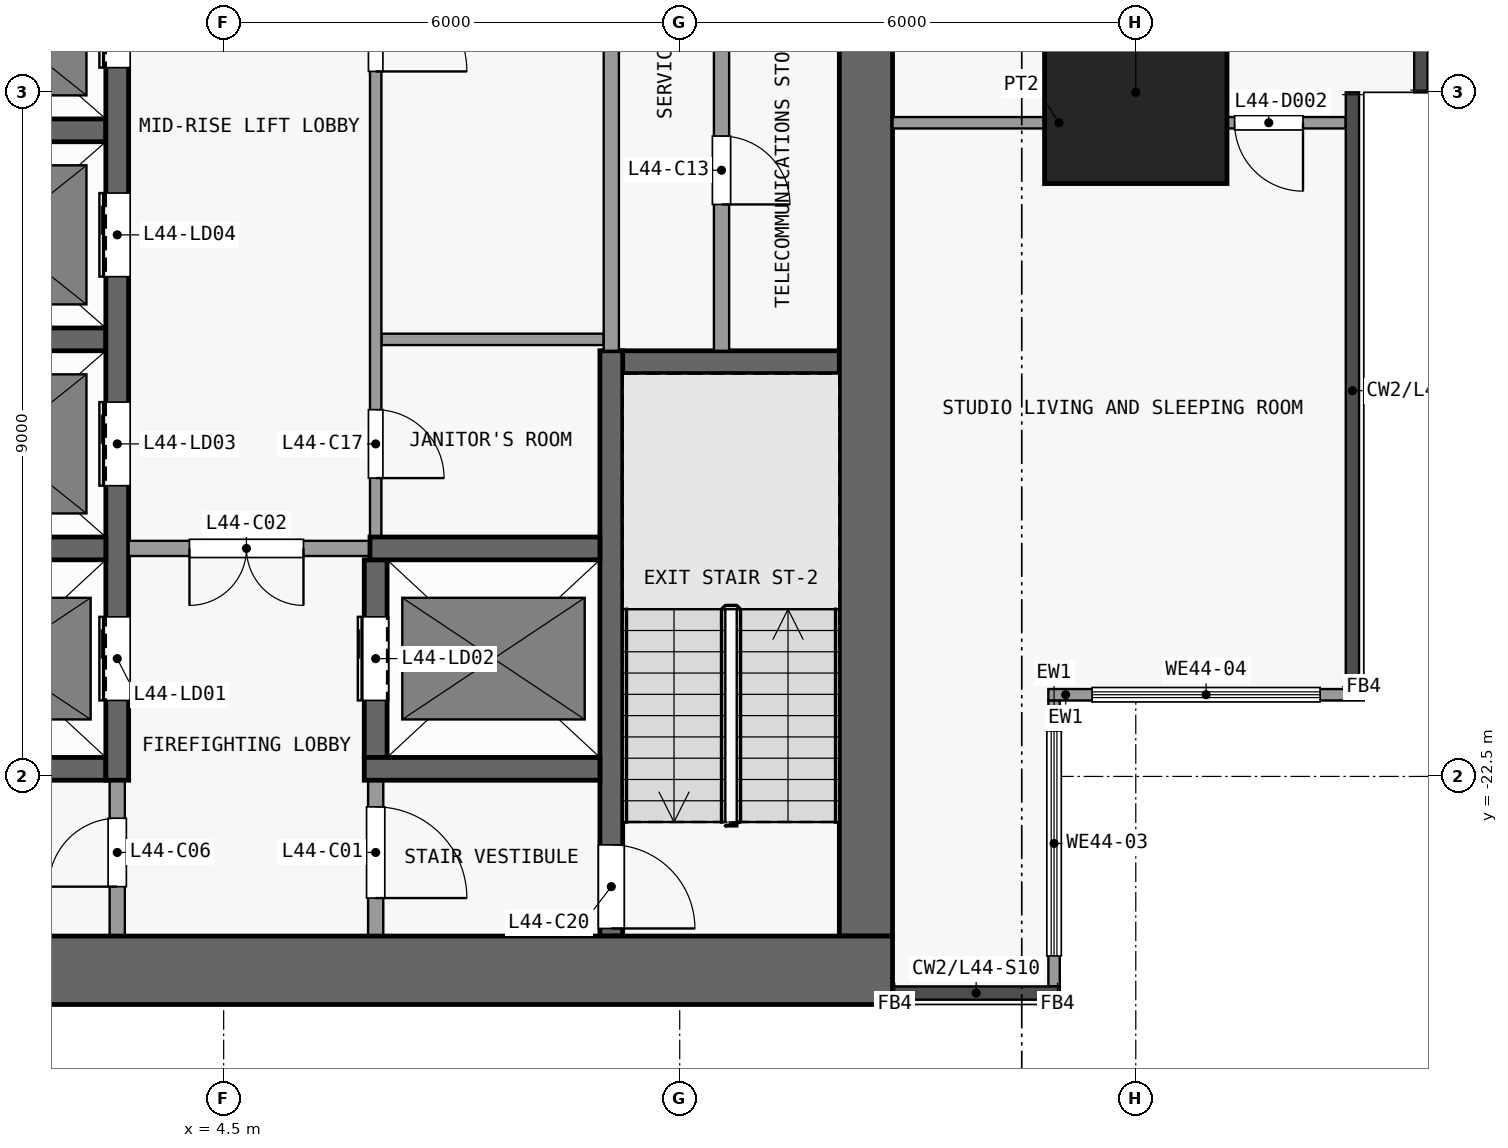
"""IFC4 building model, lengths in metres.
Left out: names, types, materials, properties, quantities, classifications, styles, units other than length and angle.
Written with IfcOpenShell. Run it as: python <this file> out.ifc"""

import sys

from ifc_helpers import new_model, si_unit, direction, frame, frame_2d, origin, origin_2d, place, context, subcontext, project, spatial, rectangle, extrude, element, fill, save


model = new_model("IFC4")
c1 = context("Model", 3, precision=1e-05, world=origin(), true_north=direction((0.0, 1.0)))
c2 = subcontext(c1, "Body", "Model", "MODEL_VIEW")
j1 = project(units=[si_unit("LENGTHUNIT", "METRE"), si_unit("PLANEANGLEUNIT", "RADIAN")], contexts=[c1])
p1 = place(None, origin())
s1 = spatial("IfcSite", under=j1, at=p1, CompositionType="ELEMENT")
p2 = place(p1, origin())
s2 = spatial("IfcBuilding", under=s1, at=p2, CompositionType="ELEMENT")
p3 = place(p2, frame((0.0, 0.0, 178.1)))
s3 = spatial("IfcBuildingStorey", under=s2, at=p3, CompositionType="ELEMENT", Elevation=178.1)
p4 = place(p3, frame((16.5, -13.5, 0.0), z_axis=(0.0, 0.0, 1.0), x_axis=(1.0, 0.0, 0.0)))
e1 = element("IfcColumn", 1, at=p4, inside=s3, PredefinedType="COLUMN", context=c2, shape_type="SweptSolid", body=[
    extrude(rectangle(XDim=2.4, YDim=2.4, at=origin_2d()), origin(), (0.0, 0.0, 1.0), 3.6),
])
p5 = place(p3, frame((-13.3, -25.05, 0.0), z_axis=(0.0, 0.0, 1.0), x_axis=(1.0, 0.0, 0.0)))
e2 = element("IfcWall", 2, at=p5, inside=s3, PredefinedType="SHEAR", context=c2, shape_type="SweptSolid", body=[
    extrude(rectangle(XDim=26.6, YDim=0.9, at=frame_2d((13.3, 0.0))), origin(), (0.0, 0.0, 1.0), 3.3),
])
p6 = place(p3, frame((12.95, -24.6, 0.0), z_axis=(0.0, 0.0, 1.0), x_axis=(0.0, 1.0, 0.0)))
e3 = element("IfcWall", 3, at=p6, inside=s3, PredefinedType="SHEAR", context=c2, shape_type="SweptSolid", body=[
    extrude(rectangle(XDim=16.1, YDim=0.7, at=frame_2d((8.05, 0.0))), origin(), (0.0, 0.0, 1.0), 3.3),
])
p7 = place(p3, frame((-3.25, -22.4, 0.0), z_axis=(0.0, 0.0, 1.0), x_axis=(1.0, 0.0, 0.0)))
e4 = element("IfcWall", 4, at=p7, inside=s3, PredefinedType="SHEAR", context=c2, shape_type="SweptSolid", body=[
    extrude(rectangle(XDim=6.2, YDim=0.3, at=frame_2d((3.1, 0.0))), origin(), (0.0, 0.0, 1.0), 3.3),
])
p8 = place(p3, frame((6.35, -22.4, 0.0), z_axis=(0.0, 0.0, 1.0), x_axis=(1.0, 0.0, 0.0)))
e5 = element("IfcWall", 5, at=p8, inside=s3, PredefinedType="SHEAR", context=c2, shape_type="SweptSolid", body=[
    extrude(rectangle(XDim=3.1, YDim=0.3, at=frame_2d((1.55, 0.0))), origin(), (0.0, 0.0, 1.0), 3.3),
])
p9 = place(p3, frame((0.15, -19.5, 0.0), z_axis=(0.0, 0.0, 1.0), x_axis=(1.0, 0.0, 0.0)))
e6 = element("IfcWall", 6, at=p9, inside=s3, PredefinedType="SHEAR", context=c2, shape_type="SweptSolid", body=[
    extrude(rectangle(XDim=2.8, YDim=0.3, at=frame_2d((1.4, 0.0))), origin(), (0.0, 0.0, 1.0), 3.3),
])
p10 = place(p3, frame((6.575, -19.5, 0.0), z_axis=(0.0, 0.0, 1.0), x_axis=(-1.0, 0.0, 0.0)))
e7 = element("IfcWall", 7, at=p10, inside=s3, PredefinedType="PARTITIONING", context=c2, shape_type="SweptSolid", body=[
    extrude(rectangle(XDim=3.325, YDim=0.2, at=frame_2d((1.663, 0.0))), origin(), (0.0, 0.0, 1.0), 3.3),
])
p11 = place(p10, frame((1.025, 0.0, 0.0)))
e8 = element("IfcOpeningElement", 8, at=p11, cuts=e7, PredefinedType="OPENING", context=c2, shape_type="SweptSolid", body=[
    extrude(rectangle(XDim=1.5, YDim=2.1, at=frame_2d((0.75, 1.05))), frame((0.0, 0.11, 0.0), z_axis=(0.0, -1.0, 0.0), x_axis=(1.0, 0.0, 0.0)), (0.0, 0.0, 1.0), 0.22),
])
p12 = place(p3, frame((6.425, -19.5, 0.0), z_axis=(0.0, 0.0, 1.0), x_axis=(1.0, 0.0, 0.0)))
e9 = element("IfcWall", 9, at=p12, inside=s3, PredefinedType="SHEAR", context=c2, shape_type="SweptSolid", body=[
    extrude(rectangle(XDim=3.025, YDim=0.3, at=frame_2d((1.512, 0.0))), origin(), (0.0, 0.0, 1.0), 3.3),
])
p13 = place(p3, frame((9.5, -17.05, 0.0), z_axis=(0.0, 0.0, 1.0), x_axis=(1.0, 0.0, 0.0)))
e10 = element("IfcWall", 10, at=p13, inside=s3, PredefinedType="SHEAR", context=c2, shape_type="SweptSolid", body=[
    extrude(rectangle(XDim=3.1, YDim=0.3, at=frame_2d((1.55, 0.0))), origin(), (0.0, 0.0, 1.0), 3.3),
])
p14 = place(p3, frame((0.15, -16.75, 0.0), z_axis=(0.0, 0.0, 1.0), x_axis=(1.0, 0.0, 0.0)))
e11 = element("IfcWall", 11, at=p14, inside=s3, PredefinedType="SHEAR", context=c2, shape_type="SweptSolid", body=[
    extrude(rectangle(XDim=2.8, YDim=0.3, at=frame_2d((1.4, 0.0))), origin(), (0.0, 0.0, 1.0), 3.3),
])
p15 = place(p3, frame((6.575, -16.75, 0.0), z_axis=(0.0, 0.0, 1.0), x_axis=(1.0, 0.0, 0.0)))
e12 = element("IfcWall", 12, at=p15, inside=s3, PredefinedType="PARTITIONING", context=c2, shape_type="SweptSolid", body=[
    extrude(rectangle(XDim=2.925, YDim=0.15, at=frame_2d((1.462, 0.0))), origin(), (0.0, 0.0, 1.0), 3.3),
])
p16 = place(p3, frame((0.15, -14.0, 0.0), z_axis=(0.0, 0.0, 1.0), x_axis=(1.0, 0.0, 0.0)))
e13 = element("IfcWall", 13, at=p16, inside=s3, PredefinedType="SHEAR", context=c2, shape_type="SweptSolid", body=[
    extrude(rectangle(XDim=2.8, YDim=0.3, at=frame_2d((1.4, 0.0))), origin(), (0.0, 0.0, 1.0), 3.3),
])
p17 = place(p3, frame((3.1, -24.6, 0.0), z_axis=(0.0, 0.0, 1.0), x_axis=(0.0, 1.0, 0.0)))
e14 = element("IfcWall", 14, at=p17, inside=s3, PredefinedType="PARTITIONING", context=c2, shape_type="SweptSolid", body=[
    extrude(rectangle(XDim=2.05, YDim=0.2, at=frame_2d((1.025, 0.0))), origin(), (0.0, 0.0, 1.0), 3.3),
])
p18 = place(p17, frame((0.65, 0.0, 0.0)))
e15 = element("IfcOpeningElement", 15, at=p18, cuts=e14, PredefinedType="OPENING", context=c2, shape_type="SweptSolid", body=[
    extrude(rectangle(XDim=0.9, YDim=2.1, at=frame_2d((0.45, 1.05))), frame((0.0, 0.11, 0.0), z_axis=(0.0, -1.0, 0.0), x_axis=(1.0, 0.0, 0.0)), (0.0, 0.0, 1.0), 0.22),
])
p19 = place(p3, frame((3.1, -22.55, 0.0), z_axis=(0.0, 0.0, 1.0), x_axis=(0.0, 1.0, 0.0)))
e16 = element("IfcWall", 16, at=p19, inside=s3, PredefinedType="SHEAR", context=c2, shape_type="SweptSolid", body=[
    extrude(rectangle(XDim=14.05, YDim=0.3, at=frame_2d((7.025, 0.0))), origin(), (0.0, 0.0, 1.0), 3.3),
])
p20 = place(p19, frame((1.05, 0.0, 0.0)))
e17 = element("IfcOpeningElement", 17, at=p20, cuts=e16, PredefinedType="OPENING", context=c2, shape_type="SweptSolid", body=[
    extrude(rectangle(XDim=1.1, YDim=2.1, at=frame_2d((0.55, 1.05))), frame((0.0, 0.16, 0.0), z_axis=(0.0, -1.0, 0.0), x_axis=(1.0, 0.0, 0.0)), (0.0, 0.0, 1.0), 0.32),
])
p21 = place(p19, frame((3.875, 0.0, 0.0)))
e18 = element("IfcOpeningElement", 18, at=p21, cuts=e16, PredefinedType="OPENING", context=c2, shape_type="SweptSolid", body=[
    extrude(rectangle(XDim=1.1, YDim=2.1, at=frame_2d((0.55, 1.05))), frame((0.0, 0.16, 0.0), z_axis=(0.0, -1.0, 0.0), x_axis=(1.0, 0.0, 0.0)), (0.0, 0.0, 1.0), 0.32),
])
p22 = place(p19, frame((6.625, 0.0, 0.0)))
e19 = element("IfcOpeningElement", 19, at=p22, cuts=e16, PredefinedType="OPENING", context=c2, shape_type="SweptSolid", body=[
    extrude(rectangle(XDim=1.1, YDim=2.1, at=frame_2d((0.55, 1.05))), frame((0.0, 0.16, 0.0), z_axis=(0.0, -1.0, 0.0), x_axis=(1.0, 0.0, 0.0)), (0.0, 0.0, 1.0), 0.32),
])
p23 = place(p19, frame((9.375, 0.0, 0.0)))
e20 = element("IfcOpeningElement", 20, at=p23, cuts=e16, PredefinedType="OPENING", context=c2, shape_type="SweptSolid", body=[
    extrude(rectangle(XDim=1.1, YDim=2.1, at=frame_2d((0.55, 1.05))), frame((0.0, 0.16, 0.0), z_axis=(0.0, -1.0, 0.0), x_axis=(1.0, 0.0, 0.0)), (0.0, 0.0, 1.0), 0.32),
])
p24 = place(p19, frame((12.125, 0.0, 0.0)))
e21 = element("IfcOpeningElement", 21, at=p24, cuts=e16, PredefinedType="OPENING", context=c2, shape_type="SweptSolid", body=[
    extrude(rectangle(XDim=1.1, YDim=2.1, at=frame_2d((0.55, 1.05))), frame((0.0, 0.16, 0.0), z_axis=(0.0, -1.0, 0.0), x_axis=(1.0, 0.0, 0.0)), (0.0, 0.0, 1.0), 0.32),
])
p25 = place(p3, frame((6.5, -22.55, 0.0), z_axis=(0.0, 0.0, 1.0), x_axis=(0.0, -1.0, 0.0)))
e22 = element("IfcWall", 22, at=p25, inside=s3, PredefinedType="PARTITIONING", context=c2, shape_type="SweptSolid", body=[
    extrude(rectangle(XDim=2.05, YDim=0.2, at=frame_2d((1.025, 0.0))), origin(), (0.0, 0.0, 1.0), 3.3),
])
p26 = place(p25, frame((0.35, 0.0, 0.0)))
e23 = element("IfcOpeningElement", 23, at=p26, cuts=e22, PredefinedType="OPENING", context=c2, shape_type="SweptSolid", body=[
    extrude(rectangle(XDim=1.2, YDim=2.1, at=frame_2d((0.6, 1.05))), frame((0.0, 0.11, 0.0), z_axis=(0.0, -1.0, 0.0), x_axis=(1.0, 0.0, 0.0)), (0.0, 0.0, 1.0), 0.22),
])
p27 = place(p3, frame((6.5, -22.25, 0.0), z_axis=(0.0, 0.0, 1.0), x_axis=(0.0, 1.0, 0.0)))
e24 = element("IfcWall", 24, at=p27, inside=s3, PredefinedType="SHEAR", context=c2, shape_type="SweptSolid", body=[
    extrude(rectangle(XDim=2.6, YDim=0.3, at=frame_2d((1.3, 0.0))), origin(), (0.0, 0.0, 1.0), 3.3),
])
p28 = place(p27, frame((0.75, 0.0, 0.0)))
e25 = element("IfcOpeningElement", 25, at=p28, cuts=e24, PredefinedType="OPENING", context=c2, shape_type="SweptSolid", body=[
    extrude(rectangle(XDim=1.1, YDim=2.1, at=frame_2d((0.55, 1.05))), frame((0.0, 0.16, 0.0), z_axis=(0.0, -1.0, 0.0), x_axis=(1.0, 0.0, 0.0)), (0.0, 0.0, 1.0), 0.32),
])
p29 = place(p3, frame((6.5, -8.5, 0.0), z_axis=(0.0, 0.0, 1.0), x_axis=(0.0, -1.0, 0.0)))
e26 = element("IfcWall", 26, at=p29, inside=s3, PredefinedType="PARTITIONING", context=c2, shape_type="SweptSolid", body=[
    extrude(rectangle(XDim=10.85, YDim=0.15, at=frame_2d((5.425, 0.0))), origin(), (0.0, 0.0, 1.0), 3.3),
])
p30 = place(p29, frame((9.175, 0.0, 0.0)))
e27 = element("IfcOpeningElement", 27, at=p30, cuts=e26, PredefinedType="OPENING", context=c2, shape_type="SweptSolid", body=[
    extrude(rectangle(XDim=0.9, YDim=2.1, at=frame_2d((0.45, 1.05))), frame((0.0, 0.085, 0.0), z_axis=(0.0, -1.0, 0.0), x_axis=(1.0, 0.0, 0.0)), (0.0, 0.0, 1.0), 0.17),
])
p31 = place(p29, frame((3.525, 0.0, 0.0)))
e28 = element("IfcOpeningElement", 28, at=p31, cuts=e26, PredefinedType="OPENING", context=c2, shape_type="SweptSolid", body=[
    extrude(rectangle(XDim=1.2, YDim=2.1, at=frame_2d((0.6, 1.05))), frame((0.0, 0.085, 0.0), z_axis=(0.0, -1.0, 0.0), x_axis=(1.0, 0.0, 0.0)), (0.0, 0.0, 1.0), 0.17),
])
p32 = place(p3, frame((9.6, -16.9, 0.0), z_axis=(0.0, 0.0, 1.0), x_axis=(0.0, -1.0, 0.0)))
e29 = element("IfcWall", 29, at=p32, inside=s3, PredefinedType="SHEAR", context=c2, shape_type="SweptSolid", body=[
    extrude(rectangle(XDim=7.7, YDim=0.3, at=frame_2d((3.85, 0.0))), origin(), (0.0, 0.0, 1.0), 3.3),
])
p33 = place(p32, frame((6.5, 0.0, 0.0)))
e30 = element("IfcOpeningElement", 30, at=p33, cuts=e29, PredefinedType="OPENING", context=c2, shape_type="SweptSolid", body=[
    extrude(rectangle(XDim=1.1, YDim=2.1, at=frame_2d((0.55, 1.05))), frame((0.0, 0.16, 0.0), z_axis=(0.0, -1.0, 0.0), x_axis=(1.0, 0.0, 0.0)), (0.0, 0.0, 1.0), 0.32),
])
p34 = place(p3, frame((9.6, -16.9, 0.0), z_axis=(0.0, 0.0, 1.0), x_axis=(0.0, 1.0, 0.0)))
e31 = element("IfcWall", 31, at=p34, inside=s3, PredefinedType="PARTITIONING", context=c2, shape_type="SweptSolid", body=[
    extrude(rectangle(XDim=8.4, YDim=0.2, at=frame_2d((4.2, 0.0))), origin(), (0.0, 0.0, 1.0), 3.3),
])
p35 = place(p3, frame((11.05, -11.9, 0.0), z_axis=(0.0, 0.0, 1.0), x_axis=(0.0, -1.0, 0.0)))
e32 = element("IfcWall", 32, at=p35, inside=s3, PredefinedType="PARTITIONING", context=c2, shape_type="SweptSolid", body=[
    extrude(rectangle(XDim=5.0, YDim=0.2, at=frame_2d((2.5, 0.0))), origin(), (0.0, 0.0, 1.0), 3.3),
])
p36 = place(p35, frame((2.175, 0.0, 0.0)))
e33 = element("IfcOpeningElement", 33, at=p36, cuts=e32, PredefinedType="OPENING", context=c2, shape_type="SweptSolid", body=[
    extrude(rectangle(XDim=0.9, YDim=2.1, at=frame_2d((0.45, 1.05))), frame((0.0, 0.11, 0.0), z_axis=(0.0, -1.0, 0.0), x_axis=(1.0, 0.0, 0.0)), (0.0, 0.0, 1.0), 0.22),
])
p37 = place(p3, frame((15.425, -21.5, 0.0), z_axis=(0.0, 0.0, 1.0), x_axis=(0.0, -1.0, 0.0)))
e34 = element("IfcWall", 34, at=p37, inside=s3, PredefinedType="SOLIDWALL", context=c2, shape_type="SweptSolid", body=[
    extrude(rectangle(XDim=3.762, YDim=0.15, at=frame_2d((1.881, 0.0))), origin(), (0.0, 0.0, 1.0), 3.3),
])
p38 = place(p37, frame((0.401, 0.0, 0.9)))
e35 = element("IfcOpeningElement", 35, at=p38, cuts=e34, PredefinedType="OPENING", context=c2, shape_type="SweptSolid", body=[
    extrude(rectangle(XDim=2.96, YDim=2.4, at=frame_2d((1.48, 1.2))), frame((0.0, 0.085, 0.0), z_axis=(0.0, -1.0, 0.0), x_axis=(1.0, 0.0, 0.0)), (0.0, 0.0, 1.0), 0.17),
])
p39 = place(p3, frame((19.5, -21.425, 0.0), z_axis=(0.0, 0.0, 1.0), x_axis=(-1.0, 0.0, 0.0)))
e36 = element("IfcWall", 36, at=p39, inside=s3, PredefinedType="SOLIDWALL", context=c2, shape_type="SweptSolid", body=[
    extrude(rectangle(XDim=4.15, YDim=0.15, at=frame_2d((2.075, 0.0))), origin(), (0.0, 0.0, 1.0), 3.3),
])
p40 = place(p39, frame((0.575, 0.0, 0.9)))
e37 = element("IfcOpeningElement", 37, at=p40, cuts=e36, PredefinedType="OPENING", context=c2, shape_type="SweptSolid", body=[
    extrude(rectangle(XDim=3.0, YDim=2.4, at=frame_2d((1.5, 1.2))), frame((0.0, 0.085, 0.0), z_axis=(0.0, -1.0, 0.0), x_axis=(1.0, 0.0, 0.0)), (0.0, 0.0, 1.0), 0.17),
])
p41 = place(p3, frame((13.3, -13.9, 0.0), z_axis=(0.0, 0.0, 1.0), x_axis=(1.0, 0.0, 0.0)))
e38 = element("IfcWall", 38, at=p41, inside=s3, PredefinedType="PARTITIONING", context=c2, shape_type="SweptSolid", body=[
    extrude(rectangle(XDim=5.962, YDim=0.15, at=frame_2d((2.981, 0.0))), origin(), (0.0, 0.0, 1.0), 3.3),
])
p42 = place(p41, frame((4.5, 0.0, 0.0)))
e39 = element("IfcOpeningElement", 39, at=p42, cuts=e38, PredefinedType="OPENING", context=c2, shape_type="SweptSolid", body=[
    extrude(rectangle(XDim=0.9, YDim=2.1, at=frame_2d((0.45, 1.05))), frame((0.0, 0.085, 0.0), z_axis=(0.0, -1.0, 0.0), x_axis=(1.0, 0.0, 0.0)), (0.0, 0.0, 1.0), 0.17),
])
p43 = place(p3, frame((16.3, -13.825, 0.0), z_axis=(0.0, 0.0, 1.0), x_axis=(0.0, 1.0, 0.0)))
e40 = element("IfcWall", 40, at=p43, inside=s3, PredefinedType="PARTITIONING", context=c2, shape_type="SweptSolid", body=[
    extrude(rectangle(XDim=2.85, YDim=0.15, at=frame_2d((1.425, 0.0))), origin(), (0.0, 0.0, 1.0), 3.3),
])
p44 = place(p20, origin())
e41 = element("IfcDoor", 41, at=p44, inside=s3, OperationType="DOUBLE_DOOR_SLIDING", PredefinedType="DOOR", context=c2, shape_type="SweptSolid", body=[
    extrude(rectangle(XDim=1.1, YDim=2.1, at=frame_2d((0.55, 1.05))), frame((0.0, 0.025, 0.0), z_axis=(0.0, -1.0, 0.0), x_axis=(1.0, 0.0, 0.0)), (0.0, 0.0, 1.0), 0.05),
])
fill(e17, e41)
p45 = place(p28, origin())
e42 = element("IfcDoor", 42, at=p45, inside=s3, OperationType="DOUBLE_DOOR_SLIDING", PredefinedType="DOOR", context=c2, shape_type="SweptSolid", body=[
    extrude(rectangle(XDim=1.1, YDim=2.1, at=frame_2d((0.55, 1.05))), frame((0.0, 0.025, 0.0), z_axis=(0.0, -1.0, 0.0), x_axis=(1.0, 0.0, 0.0)), (0.0, 0.0, 1.0), 0.05),
])
fill(e25, e42)
p46 = place(p21, origin())
e43 = element("IfcDoor", 43, at=p46, inside=s3, OperationType="DOUBLE_DOOR_SLIDING", PredefinedType="DOOR", context=c2, shape_type="SweptSolid", body=[
    extrude(rectangle(XDim=1.1, YDim=2.1, at=frame_2d((0.55, 1.05))), frame((0.0, 0.025, 0.0), z_axis=(0.0, -1.0, 0.0), x_axis=(1.0, 0.0, 0.0)), (0.0, 0.0, 1.0), 0.05),
])
fill(e18, e43)
p47 = place(p22, origin())
e44 = element("IfcDoor", 44, at=p47, inside=s3, OperationType="DOUBLE_DOOR_SLIDING", PredefinedType="DOOR", context=c2, shape_type="SweptSolid", body=[
    extrude(rectangle(XDim=1.1, YDim=2.1, at=frame_2d((0.55, 1.05))), frame((0.0, 0.025, 0.0), z_axis=(0.0, -1.0, 0.0), x_axis=(1.0, 0.0, 0.0)), (0.0, 0.0, 1.0), 0.05),
])
fill(e19, e44)
p48 = place(p23, origin())
e45 = element("IfcDoor", 45, at=p48, inside=s3, OperationType="DOUBLE_DOOR_SLIDING", PredefinedType="DOOR", context=c2, shape_type="SweptSolid", body=[
    extrude(rectangle(XDim=1.1, YDim=2.1, at=frame_2d((0.55, 1.05))), frame((0.0, 0.025, 0.0), z_axis=(0.0, -1.0, 0.0), x_axis=(1.0, 0.0, 0.0)), (0.0, 0.0, 1.0), 0.05),
])
fill(e20, e45)
p49 = place(p26, origin())
e46 = element("IfcDoor", 46, at=p49, inside=s3, OperationType="SINGLE_SWING_RIGHT", PredefinedType="DOOR", context=c2, shape_type="SweptSolid", body=[
    extrude(rectangle(XDim=1.2, YDim=2.1, at=frame_2d((0.6, 1.05))), frame((0.0, 0.025, 0.0), z_axis=(0.0, -1.0, 0.0), x_axis=(1.0, 0.0, 0.0)), (0.0, 0.0, 1.0), 0.05),
])
fill(e23, e46)
p50 = place(p11, origin())
e47 = element("IfcDoor", 47, at=p50, inside=s3, OperationType="DOUBLE_DOOR_SINGLE_SWING", PredefinedType="DOOR", context=c2, shape_type="SweptSolid", body=[
    extrude(rectangle(XDim=1.5, YDim=2.1, at=frame_2d((0.75, 1.05))), frame((0.0, 0.025, 0.0), z_axis=(0.0, -1.0, 0.0), x_axis=(1.0, 0.0, 0.0)), (0.0, 0.0, 1.0), 0.05),
])
fill(e8, e47)
p51 = place(p18, origin())
e48 = element("IfcDoor", 48, at=p51, inside=s3, OperationType="SINGLE_SWING_LEFT", PredefinedType="DOOR", context=c2, shape_type="SweptSolid", body=[
    extrude(rectangle(XDim=0.9, YDim=2.1, at=frame_2d((0.45, 1.05))), frame((0.0, 0.025, 0.0), z_axis=(0.0, -1.0, 0.0), x_axis=(1.0, 0.0, 0.0)), (0.0, 0.0, 1.0), 0.05),
])
fill(e15, e48)
p52 = place(p36, origin())
e49 = element("IfcDoor", 49, at=p52, inside=s3, OperationType="SINGLE_SWING_RIGHT", PredefinedType="DOOR", context=c2, shape_type="SweptSolid", body=[
    extrude(rectangle(XDim=0.9, YDim=2.1, at=frame_2d((0.45, 1.05))), frame((0.0, 0.025, 0.0), z_axis=(0.0, -1.0, 0.0), x_axis=(1.0, 0.0, 0.0)), (0.0, 0.0, 1.0), 0.05),
])
fill(e33, e49)
p53 = place(p30, origin())
e50 = element("IfcDoor", 50, at=p53, inside=s3, OperationType="SINGLE_SWING_RIGHT", PredefinedType="DOOR", context=c2, shape_type="SweptSolid", body=[
    extrude(rectangle(XDim=0.9, YDim=2.1, at=frame_2d((0.45, 1.05))), frame((0.0, 0.025, 0.0), z_axis=(0.0, -1.0, 0.0), x_axis=(1.0, 0.0, 0.0)), (0.0, 0.0, 1.0), 0.05),
])
fill(e27, e50)
p54 = place(p31, origin())
e51 = element("IfcDoor", 51, at=p54, inside=s3, OperationType="SINGLE_SWING_RIGHT", PredefinedType="DOOR", context=c2, shape_type="SweptSolid", body=[
    extrude(rectangle(XDim=1.2, YDim=2.1, at=frame_2d((0.6, 1.05))), frame((0.0, 0.025, 0.0), z_axis=(0.0, -1.0, 0.0), x_axis=(1.0, 0.0, 0.0)), (0.0, 0.0, 1.0), 0.05),
])
fill(e28, e51)
p55 = place(p33, origin())
e52 = element("IfcDoor", 52, at=p55, inside=s3, OperationType="SINGLE_SWING_RIGHT", PredefinedType="DOOR", context=c2, shape_type="SweptSolid", body=[
    extrude(rectangle(XDim=1.1, YDim=2.1, at=frame_2d((0.55, 1.05))), frame((0.0, 0.025, 0.0), z_axis=(0.0, -1.0, 0.0), x_axis=(1.0, 0.0, 0.0)), (0.0, 0.0, 1.0), 0.05),
])
fill(e30, e52)
p56 = place(p38, origin())
e53 = element("IfcWindow", 53, at=p56, inside=s3, PartitioningType="SINGLE_PANEL", PredefinedType="WINDOW", context=c2, shape_type="SweptSolid", body=[
    extrude(rectangle(XDim=2.96, YDim=2.4, at=frame_2d((1.48, 1.2))), frame((0.0, 0.03, 0.0), z_axis=(0.0, -1.0, 0.0), x_axis=(1.0, 0.0, 0.0)), (0.0, 0.0, 1.0), 0.06),
])
fill(e35, e53)
p57 = place(p40, origin())
e54 = element("IfcWindow", 54, at=p57, inside=s3, PartitioningType="SINGLE_PANEL", PredefinedType="WINDOW", context=c2, shape_type="SweptSolid", body=[
    extrude(rectangle(XDim=3.0, YDim=2.4, at=frame_2d((1.5, 1.2))), frame((0.0, 0.03, 0.0), z_axis=(0.0, -1.0, 0.0), x_axis=(1.0, 0.0, 0.0)), (0.0, 0.0, 1.0), 0.06),
])
fill(e37, e54)
p58 = place(p42, origin())
e55 = element("IfcDoor", 55, at=p58, inside=s3, OperationType="SINGLE_SWING_RIGHT", PredefinedType="DOOR", context=c2, shape_type="SweptSolid", body=[
    extrude(rectangle(XDim=0.9, YDim=2.1, at=frame_2d((0.45, 1.05))), frame((0.0, 0.025, 0.0), z_axis=(0.0, -1.0, 0.0), x_axis=(1.0, 0.0, 0.0)), (0.0, 0.0, 1.0), 0.05),
])
fill(e39, e55)
save(model, sys.argv[1])
